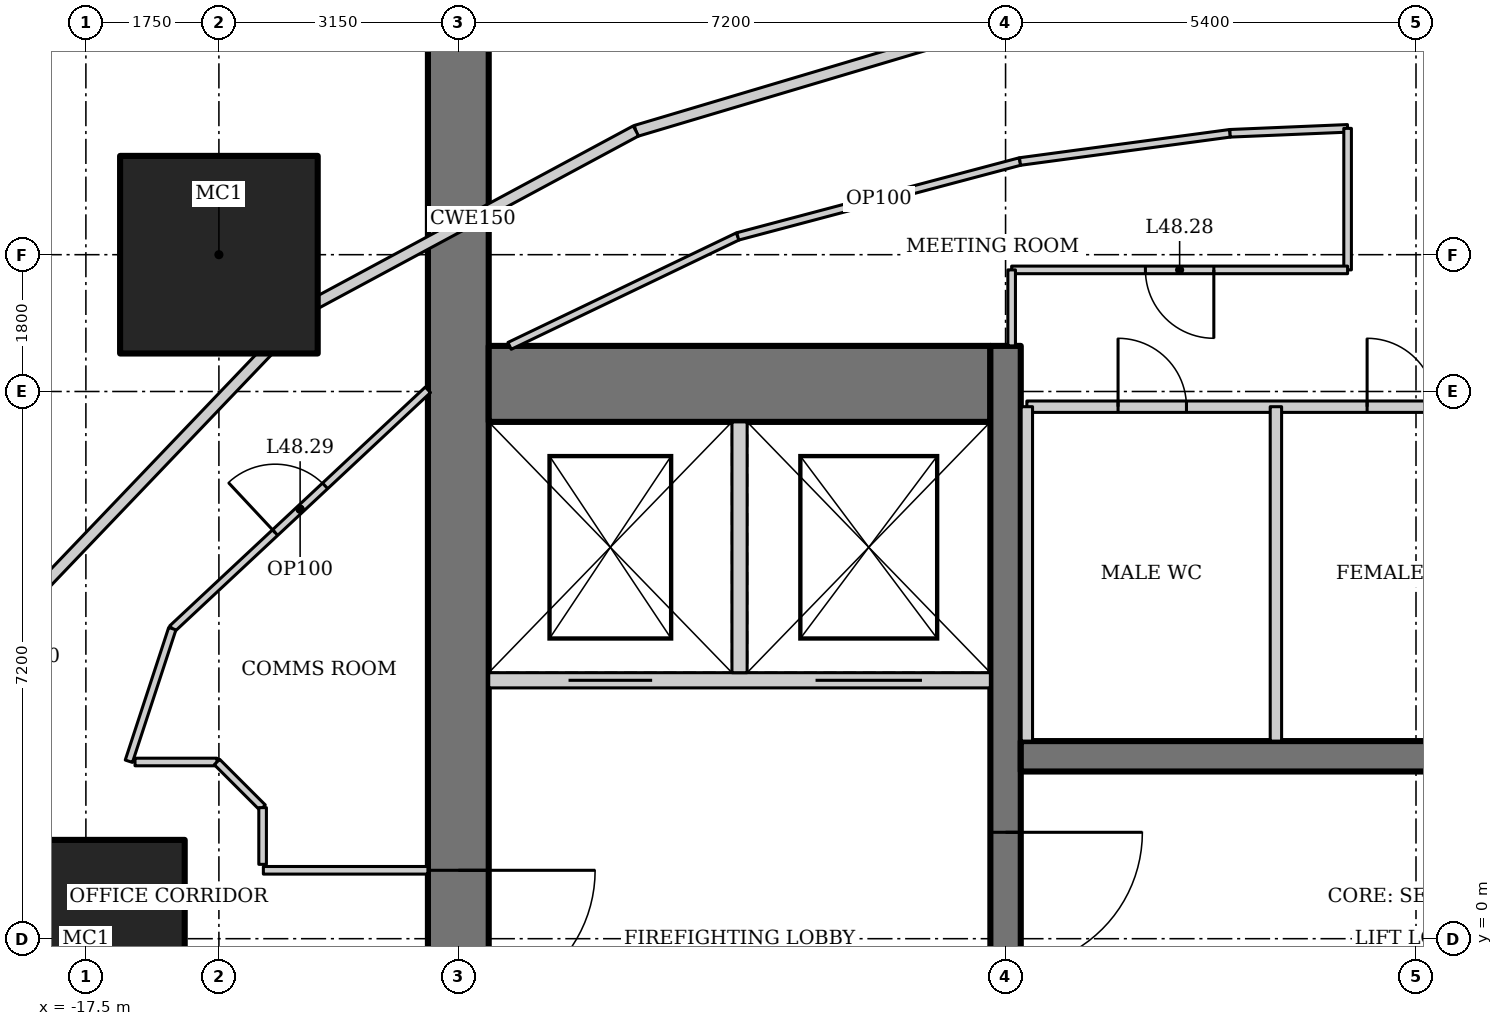
"""IFC4 building model, lengths in metres.
Left out: names, types, materials, properties, quantities, classifications, styles, units other than length and angle.
Written with IfcOpenShell. Run it as: python <this file> out.ifc"""

import sys

from ifc_helpers import new_model, si_unit, direction, frame, frame_2d, origin, origin_2d, place, context, subcontext, project, spatial, rectangle, hollow_rectangle, extrude, element, fill, save


model = new_model("IFC4")
c1 = context("Model", 3, precision=1e-05, world=origin(), true_north=direction((0.0, 1.0)))
c2 = subcontext(c1, "Body", "Model", "MODEL_VIEW")
j1 = project(units=[si_unit("LENGTHUNIT", "METRE"), si_unit("PLANEANGLEUNIT", "RADIAN")], contexts=[c1])
p1 = place(None, origin())
s1 = spatial("IfcSite", under=j1, at=p1, CompositionType="ELEMENT")
p2 = place(p1, origin())
s2 = spatial("IfcBuilding", under=s1, at=p2, CompositionType="ELEMENT")
p3 = place(p2, frame((0.0, 0.0, 207.4)))
s3 = spatial("IfcBuildingStorey", under=s2, at=p3, CompositionType="ELEMENT", Elevation=207.4)
for number, where, z_axis, x_axis in (
    (1, (-15.75, 9.0, 0.0), (0.0, 0.0, 1.0), (1.0, 0.0, 0.0)),
    (2, (-17.5, 0.0, 0.0), (0.0, 0.0, 1.0), (1.0, 0.0, 0.0)),
):
    element("IfcColumn", number, at=place(p3, frame(where, z_axis=z_axis, x_axis=x_axis)), inside=s3, PredefinedType="COLUMN", context=c2, shape_type="SweptSolid", body=[
        extrude(hollow_rectangle(XDim=2.6, YDim=2.6, WallThickness=0.13, at=origin_2d()), origin(), (0.0, 0.0, 1.0), 4.2),
    ])
p4 = place(p3, frame((-12.6, 13.0, 0.0), z_axis=(0.0, 0.0, 1.0), x_axis=(0.0, -1.0, 0.0)))
e3 = element("IfcWall", 3, at=p4, inside=s3, PredefinedType="SHEAR", context=c2, shape_type="SweptSolid", body=[
    extrude(rectangle(XDim=26.0, YDim=0.8, at=frame_2d((13.0, 0.0))), origin(), (0.0, 0.0, 1.0), 4.2),
])
p5 = place(p4, frame((12.1, 0.0, 0.0)))
e4 = element("IfcOpeningElement", 4, at=p5, cuts=e3, PredefinedType="OPENING", context=c2, shape_type="SweptSolid", body=[
    extrude(rectangle(XDim=1.8, YDim=2.1, at=frame_2d((0.9, 1.05))), frame((0.0, 0.41, 0.0), z_axis=(0.0, -1.0, 0.0), x_axis=(1.0, 0.0, 0.0)), (0.0, 0.0, 1.0), 0.82),
])
p6 = place(p3, frame((-5.6, 7.3, 0.0), z_axis=(0.0, 0.0, 1.0), x_axis=(-1.0, 0.0, 0.0)))
e5 = element("IfcWall", 5, at=p6, inside=s3, PredefinedType="SHEAR", context=c2, shape_type="SweptSolid", body=[
    extrude(rectangle(XDim=6.6, YDim=1.0, at=frame_2d((3.3, 0.0))), origin(), (0.0, 0.0, 1.0), 4.2),
])
p7 = place(p3, frame((-5.4, 7.8, 0.0), z_axis=(0.0, 0.0, 1.0), x_axis=(0.0, -1.0, 0.0)))
e6 = element("IfcWall", 6, at=p7, inside=s3, PredefinedType="SHEAR", context=c2, shape_type="SweptSolid", body=[
    extrude(rectangle(XDim=14.6, YDim=0.4, at=frame_2d((7.3, 0.0))), origin(), (0.0, 0.0, 1.0), 4.2),
])
p8 = place(p7, frame((6.4, 0.0, 0.0)))
e7 = element("IfcOpeningElement", 7, at=p8, cuts=e6, PredefinedType="OPENING", context=c2, shape_type="SweptSolid", body=[
    extrude(rectangle(XDim=1.8, YDim=2.1, at=frame_2d((0.9, 1.05))), frame((0.0, 0.21, 0.0), z_axis=(0.0, -1.0, 0.0), x_axis=(1.0, 0.0, 0.0)), (0.0, 0.0, 1.0), 0.42),
])
p9 = place(p3, frame((5.2, 2.4, 0.0), z_axis=(0.0, 0.0, 1.0), x_axis=(-1.0, 0.0, 0.0)))
e8 = element("IfcWall", 8, at=p9, inside=s3, PredefinedType="SHEAR", context=c2, shape_type="SweptSolid", body=[
    extrude(rectangle(XDim=10.4, YDim=0.4, at=frame_2d((5.2, 0.0))), origin(), (0.0, 0.0, 1.0), 4.2),
])
p10 = place(p3, frame((-12.2, 3.4, 0.0), z_axis=(0.0, 0.0, 1.0), x_axis=(1.0, 0.0, 0.0)))
e9 = element("IfcWall", 9, at=p10, inside=s3, PredefinedType="SOLIDWALL", context=c2, shape_type="SweptSolid", body=[
    extrude(rectangle(XDim=6.6, YDim=0.2, at=frame_2d((3.3, 0.0))), origin(), (0.0, 0.0, 1.0), 4.2),
])
p11 = place(p10, frame((1.05, 0.0, 0.0)))
e10 = element("IfcOpeningElement", 10, at=p11, cuts=e9, PredefinedType="OPENING", context=c2, shape_type="SweptSolid", body=[
    extrude(rectangle(XDim=1.1, YDim=2.2, at=frame_2d((0.55, 1.1))), frame((0.0, 0.11, 0.0), z_axis=(0.0, -1.0, 0.0), x_axis=(1.0, 0.0, 0.0)), (0.0, 0.0, 1.0), 0.22),
])
p12 = place(p10, frame((4.3, 0.0, 0.0)))
e11 = element("IfcOpeningElement", 11, at=p12, cuts=e9, PredefinedType="OPENING", context=c2, shape_type="SweptSolid", body=[
    extrude(rectangle(XDim=1.4, YDim=2.2, at=frame_2d((0.7, 1.1))), frame((0.0, 0.11, 0.0), z_axis=(0.0, -1.0, 0.0), x_axis=(1.0, 0.0, 0.0)), (0.0, 0.0, 1.0), 0.22),
])
p13 = place(p3, frame((-8.9, 3.5, 0.0), z_axis=(0.0, 0.0, 1.0), x_axis=(0.0, 1.0, 0.0)))
e12 = element("IfcWall", 12, at=p13, inside=s3, PredefinedType="SOLIDWALL", context=c2, shape_type="SweptSolid", body=[
    extrude(rectangle(XDim=3.3, YDim=0.2, at=frame_2d((1.65, 0.0))), origin(), (0.0, 0.0, 1.0), 4.2),
])
p14 = place(p3, frame((-6.054, 11.882, 0.0), z_axis=(0.0, 0.0, 1.0), x_axis=(-0.958384389306, -0.285480931648, 0.0)))
e13 = element("IfcWall", 13, at=p14, inside=s3, PredefinedType="PARTITIONING", context=c2, shape_type="SweptSolid", body=[
    extrude(rectangle(XDim=4.392, YDim=0.15, at=frame_2d((2.196, 0.0))), origin(), (0.0, 0.0, 1.0), 4.05),
])
p15 = place(p3, frame((-10.264, 10.628, 0.0), z_axis=(0.0, 0.0, 1.0), x_axis=(-0.88053863253, -0.47397438393, 0.0)))
e14 = element("IfcWall", 14, at=p15, inside=s3, PredefinedType="PARTITIONING", context=c2, shape_type="SweptSolid", body=[
    extrude(rectangle(XDim=4.875, YDim=0.15, at=frame_2d((2.438, 0.0))), origin(), (0.0, 0.0, 1.0), 4.05),
])
p16 = place(p3, frame((-14.556, 8.318, 0.0), z_axis=(0.0, 0.0, 1.0), x_axis=(-0.690768413292, -0.723076067366, 0.0)))
e15 = element("IfcWall", 15, at=p16, inside=s3, PredefinedType="PARTITIONING", context=c2, shape_type="SweptSolid", body=[
    extrude(rectangle(XDim=5.237, YDim=0.15, at=frame_2d((2.618, 0.0))), origin(), (0.0, 0.0, 1.0), 4.05),
])
p17 = place(p3, frame((-5.12, 7.0, 0.0), z_axis=(0.0, 0.0, 1.0), x_axis=(1.0, 0.0, 0.0)))
e16 = element("IfcWall", 16, at=p17, inside=s3, PredefinedType="SOLIDWALL", context=c2, shape_type="SweptSolid", body=[
    extrude(rectangle(XDim=10.24, YDim=0.15, at=frame_2d((5.12, 0.0))), origin(), (0.0, 0.0, 1.0), 4.05),
])
p18 = place(p17, frame((1.2, 0.0, 0.0)))
e17 = element("IfcOpeningElement", 17, at=p18, cuts=e16, PredefinedType="OPENING", context=c2, shape_type="SweptSolid", body=[
    extrude(rectangle(XDim=0.9, YDim=2.1, at=frame_2d((0.45, 1.05))), frame((0.0, 0.085, 0.0), z_axis=(0.0, -1.0, 0.0), x_axis=(1.0, 0.0, 0.0)), (0.0, 0.0, 1.0), 0.17),
])
p19 = place(p17, frame((4.477, 0.0, 0.0)))
e18 = element("IfcOpeningElement", 18, at=p19, cuts=e16, PredefinedType="OPENING", context=c2, shape_type="SweptSolid", body=[
    extrude(rectangle(XDim=0.9, YDim=2.1, at=frame_2d((0.45, 1.05))), frame((0.0, 0.085, 0.0), z_axis=(0.0, -1.0, 0.0), x_axis=(1.0, 0.0, 0.0)), (0.0, 0.0, 1.0), 0.17),
])
p20 = place(p17, frame((7.054, 0.0, 0.0)))
e19 = element("IfcOpeningElement", 19, at=p20, cuts=e16, PredefinedType="OPENING", context=c2, shape_type="SweptSolid", body=[
    extrude(rectangle(XDim=1.0, YDim=2.1, at=frame_2d((0.5, 1.05))), frame((0.0, 0.085, 0.0), z_axis=(0.0, -1.0, 0.0), x_axis=(1.0, 0.0, 0.0)), (0.0, 0.0, 1.0), 0.17),
])
p21 = place(p17, frame((8.952, 0.0, 0.0)))
e20 = element("IfcOpeningElement", 20, at=p21, cuts=e16, PredefinedType="OPENING", context=c2, shape_type="SweptSolid", body=[
    extrude(rectangle(XDim=0.9, YDim=2.1, at=frame_2d((0.45, 1.05))), frame((0.0, 0.085, 0.0), z_axis=(0.0, -1.0, 0.0), x_axis=(1.0, 0.0, 0.0)), (0.0, 0.0, 1.0), 0.17),
])
for number, where, z_axis, x_axis in (
    (21, (-5.12, 2.6, 0.0), (0.0, 0.0, 1.0), (0.0, 1.0, 0.0)),
    (22, (-1.843, 2.6, 0.0), (0.0, 0.0, 1.0), (0.0, 1.0, 0.0)),
):
    element("IfcWall", number, at=place(p3, frame(where, z_axis=z_axis, x_axis=x_axis)), inside=s3, PredefinedType="SOLIDWALL", context=c2, shape_type="SweptSolid", body=[
        extrude(rectangle(XDim=4.4, YDim=0.15, at=frame_2d((2.2, 0.0))), origin(), (0.0, 0.0, 1.0), 4.05),
    ])
p22 = place(p3, frame((-11.926, 7.8, 0.0), z_axis=(0.0, 0.0, 1.0), x_axis=(0.901553947207, 0.432666708073, 0.0)))
e23 = element("IfcWall", 23, at=p22, inside=s3, PredefinedType="PARTITIONING", context=c2, shape_type="SweptSolid", body=[
    extrude(rectangle(XDim=3.33, YDim=0.1, at=frame_2d((1.665, 0.0))), origin(), (0.0, 0.0, 1.0), 4.05),
])
p23 = place(p3, frame((-8.924, 9.241, 0.0), z_axis=(0.0, 0.0, 1.0), x_axis=(0.966562200797, 0.256432275641, 0.0)))
e24 = element("IfcWall", 24, at=p23, inside=s3, PredefinedType="PARTITIONING", context=c2, shape_type="SweptSolid", body=[
    extrude(rectangle(XDim=3.842, YDim=0.1, at=frame_2d((1.921, 0.0))), origin(), (0.0, 0.0, 1.0), 4.05),
])
p24 = place(p3, frame((-5.21, 10.226, 0.0), z_axis=(0.0, 0.0, 1.0), x_axis=(0.991095131259, 0.13315570132, 0.0)))
e25 = element("IfcWall", 25, at=p24, inside=s3, PredefinedType="PARTITIONING", context=c2, shape_type="SweptSolid", body=[
    extrude(rectangle(XDim=2.789, YDim=0.1, at=frame_2d((1.395, 0.0))), origin(), (0.0, 0.0, 1.0), 4.05),
])
p25 = place(p3, frame((-2.447, 10.597, 0.0), z_axis=(0.0, 0.0, 1.0), x_axis=(0.999119627976, 0.041951984379, 0.0)))
e26 = element("IfcWall", 26, at=p25, inside=s3, PredefinedType="PARTITIONING", context=c2, shape_type="SweptSolid", body=[
    extrude(rectangle(XDim=1.548, YDim=0.1, at=frame_2d((0.774, 0.0))), origin(), (0.0, 0.0, 1.0), 4.05),
])
p26 = place(p3, frame((-0.9, 10.662, 0.0), z_axis=(0.0, 0.0, 1.0), x_axis=(0.0, -1.0, 0.0)))
e27 = element("IfcWall", 27, at=p26, inside=s3, PredefinedType="PARTITIONING", context=c2, shape_type="SweptSolid", body=[
    extrude(rectangle(XDim=1.862, YDim=0.1, at=frame_2d((0.931, 0.0))), origin(), (0.0, 0.0, 1.0), 4.05),
])
p27 = place(p3, frame((-0.9, 8.8, 0.0), z_axis=(0.0, 0.0, 1.0), x_axis=(-1.0, 0.0, 0.0)))
e28 = element("IfcWall", 28, at=p27, inside=s3, PredefinedType="PARTITIONING", context=c2, shape_type="SweptSolid", body=[
    extrude(rectangle(XDim=4.42, YDim=0.1, at=frame_2d((2.21, 0.0))), origin(), (0.0, 0.0, 1.0), 4.05),
])
p28 = place(p27, frame((1.76, 0.0, 0.0)))
e29 = element("IfcOpeningElement", 29, at=p28, cuts=e28, PredefinedType="OPENING", context=c2, shape_type="SweptSolid", body=[
    extrude(rectangle(XDim=0.9, YDim=2.1, at=frame_2d((0.45, 1.05))), frame((0.0, 0.06, 0.0), z_axis=(0.0, -1.0, 0.0), x_axis=(1.0, 0.0, 0.0)), (0.0, 0.0, 1.0), 0.12),
])
p29 = place(p3, frame((-5.32, 8.8, 0.0), z_axis=(0.0, 0.0, 1.0), x_axis=(0.0, -1.0, 0.0)))
e30 = element("IfcWall", 30, at=p29, inside=s3, PredefinedType="PARTITIONING", context=c2, shape_type="SweptSolid", body=[
    extrude(rectangle(XDim=1.0, YDim=0.1, at=frame_2d((0.5, 0.0))), origin(), (0.0, 0.0, 1.0), 4.05),
])
p30 = place(p3, frame((-16.363, 4.08, 0.0), z_axis=(0.0, 0.0, 1.0), x_axis=(0.730651186567, 0.682750938167, 0.0)))
e31 = element("IfcWall", 31, at=p30, inside=s3, PredefinedType="PARTITIONING", context=c2, shape_type="SweptSolid", body=[
    extrude(rectangle(XDim=4.603, YDim=0.1, at=frame_2d((2.301, 0.0))), origin(), (0.0, 0.0, 1.0), 4.05),
])
p31 = place(p30, frame((1.851, 0.0, 0.0)))
e32 = element("IfcOpeningElement", 32, at=p31, cuts=e31, PredefinedType="OPENING", context=c2, shape_type="SweptSolid", body=[
    extrude(rectangle(XDim=0.9, YDim=2.1, at=frame_2d((0.45, 1.05))), frame((0.0, 0.06, 0.0), z_axis=(0.0, -1.0, 0.0), x_axis=(1.0, 0.0, 0.0)), (0.0, 0.0, 1.0), 0.12),
])
p32 = place(p3, frame((-13.0, 0.9, 0.0), z_axis=(0.0, 0.0, 1.0), x_axis=(-1.0, 0.0, 0.0)))
e33 = element("IfcWall", 33, at=p32, inside=s3, PredefinedType="PARTITIONING", context=c2, shape_type="SweptSolid", body=[
    extrude(rectangle(XDim=2.165, YDim=0.1, at=frame_2d((1.083, 0.0))), origin(), (0.0, 0.0, 1.0), 4.05),
])
p33 = place(p3, frame((-16.935, 2.335, 0.0), z_axis=(0.0, 0.0, 1.0), x_axis=(0.311517212063, 0.950240509865, 0.0)))
e34 = element("IfcWall", 34, at=p33, inside=s3, PredefinedType="PARTITIONING", context=c2, shape_type="SweptSolid", body=[
    extrude(rectangle(XDim=1.836, YDim=0.1, at=frame_2d((0.918, 0.0))), origin(), (0.0, 0.0, 1.0), 4.05),
])
p34 = place(p3, frame((-16.854, 2.325, 0.0), z_axis=(0.0, 0.0, 1.0), x_axis=(1.0, 0.0, 0.0)))
e35 = element("IfcWall", 35, at=p34, inside=s3, PredefinedType="PARTITIONING", context=c2, shape_type="SweptSolid", body=[
    extrude(rectangle(XDim=1.078, YDim=0.1, at=frame_2d((0.539, 0.0))), origin(), (0.0, 0.0, 1.0), 4.05),
])
p35 = place(p3, frame((-15.775, 2.325, 0.0), z_axis=(0.0, 0.0, 1.0), x_axis=(0.707106781187, -0.707106781187, 0.0)))
e36 = element("IfcWall", 36, at=p35, inside=s3, PredefinedType="PARTITIONING", context=c2, shape_type="SweptSolid", body=[
    extrude(rectangle(XDim=0.849, YDim=0.1, at=frame_2d((0.425, 0.0))), origin(), (0.0, 0.0, 1.0), 4.05),
])
p36 = place(p3, frame((-15.175, 1.725, 0.0), z_axis=(0.0, 0.0, 1.0), x_axis=(0.0, -1.0, 0.0)))
e37 = element("IfcWall", 37, at=p36, inside=s3, PredefinedType="PARTITIONING", context=c2, shape_type="SweptSolid", body=[
    extrude(rectangle(XDim=0.746, YDim=0.1, at=frame_2d((0.373, 0.0))), origin(), (0.0, 0.0, 1.0), 4.05),
])
p37 = place(p8, origin())
e38 = element("IfcDoor", 38, at=p37, inside=s3, OperationType="DOUBLE_DOOR_DOUBLE_SWING", PredefinedType="DOOR", context=c2, shape_type="SweptSolid", body=[
    extrude(rectangle(XDim=1.8, YDim=2.1, at=frame_2d((0.9, 1.05))), frame((0.0, 0.025, 0.0), z_axis=(0.0, -1.0, 0.0), x_axis=(1.0, 0.0, 0.0)), (0.0, 0.0, 1.0), 0.05),
])
fill(e7, e38)
p38 = place(p5, origin())
e39 = element("IfcDoor", 39, at=p38, inside=s3, OperationType="DOUBLE_DOOR_DOUBLE_SWING", PredefinedType="DOOR", context=c2, shape_type="SweptSolid", body=[
    extrude(rectangle(XDim=1.8, YDim=2.1, at=frame_2d((0.9, 1.05))), frame((0.0, 0.025, 0.0), z_axis=(0.0, -1.0, 0.0), x_axis=(1.0, 0.0, 0.0)), (0.0, 0.0, 1.0), 0.05),
])
fill(e4, e39)
p39 = place(p11, origin())
e40 = element("IfcDoor", 40, at=p39, inside=s3, OperationType="DOUBLE_DOOR_SLIDING", PredefinedType="DOOR", context=c2, shape_type="SweptSolid", body=[
    extrude(rectangle(XDim=1.1, YDim=2.2, at=frame_2d((0.55, 1.1))), frame((0.0, 0.025, 0.0), z_axis=(0.0, -1.0, 0.0), x_axis=(1.0, 0.0, 0.0)), (0.0, 0.0, 1.0), 0.05),
])
fill(e10, e40)
p40 = place(p12, origin())
e41 = element("IfcDoor", 41, at=p40, inside=s3, OperationType="DOUBLE_DOOR_SLIDING", PredefinedType="DOOR", context=c2, shape_type="SweptSolid", body=[
    extrude(rectangle(XDim=1.4, YDim=2.2, at=frame_2d((0.7, 1.1))), frame((0.0, 0.025, 0.0), z_axis=(0.0, -1.0, 0.0), x_axis=(1.0, 0.0, 0.0)), (0.0, 0.0, 1.0), 0.05),
])
fill(e11, e41)
p41 = place(p18, origin())
e42 = element("IfcDoor", 42, at=p41, inside=s3, OperationType="SINGLE_SWING_LEFT", PredefinedType="DOOR", context=c2, shape_type="SweptSolid", body=[
    extrude(rectangle(XDim=0.9, YDim=2.1, at=frame_2d((0.45, 1.05))), frame((0.0, 0.025, 0.0), z_axis=(0.0, -1.0, 0.0), x_axis=(1.0, 0.0, 0.0)), (0.0, 0.0, 1.0), 0.05),
])
fill(e17, e42)
p42 = place(p19, origin())
e43 = element("IfcDoor", 43, at=p42, inside=s3, OperationType="SINGLE_SWING_LEFT", PredefinedType="DOOR", context=c2, shape_type="SweptSolid", body=[
    extrude(rectangle(XDim=0.9, YDim=2.1, at=frame_2d((0.45, 1.05))), frame((0.0, 0.025, 0.0), z_axis=(0.0, -1.0, 0.0), x_axis=(1.0, 0.0, 0.0)), (0.0, 0.0, 1.0), 0.05),
])
fill(e18, e43)
p43 = place(p28, origin())
e44 = element("IfcDoor", 44, at=p43, inside=s3, OperationType="SINGLE_SWING_LEFT", PredefinedType="DOOR", context=c2, shape_type="SweptSolid", body=[
    extrude(rectangle(XDim=0.9, YDim=2.1, at=frame_2d((0.45, 1.05))), frame((0.0, 0.025, 0.0), z_axis=(0.0, -1.0, 0.0), x_axis=(1.0, 0.0, 0.0)), (0.0, 0.0, 1.0), 0.05),
])
fill(e29, e44)
p44 = place(p31, origin())
e45 = element("IfcDoor", 45, at=p44, inside=s3, OperationType="SINGLE_SWING_LEFT", PredefinedType="DOOR", context=c2, shape_type="SweptSolid", body=[
    extrude(rectangle(XDim=0.9, YDim=2.1, at=frame_2d((0.45, 1.05))), frame((0.0, 0.025, 0.0), z_axis=(0.0, -1.0, 0.0), x_axis=(1.0, 0.0, 0.0)), (0.0, 0.0, 1.0), 0.05),
])
fill(e32, e45)
save(model, sys.argv[1])
